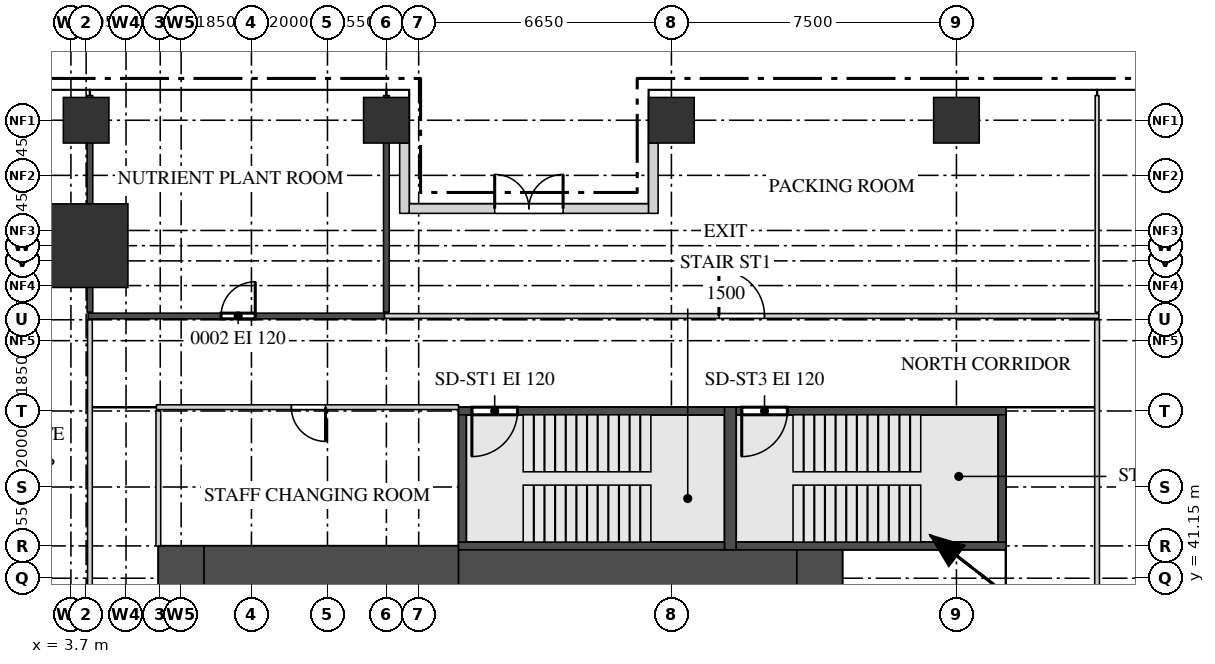
"""IFC4 building model, lengths in metres.
Left out: names, types, materials, properties, quantities, classifications, styles, units other than length and angle.
Written with IfcOpenShell. Run it as: python <this file> out.ifc"""

import sys

from ifc_helpers import new_model, si_unit, direction, frame, frame_2d, origin, origin_2d, place, context, subcontext, project, spatial, rectangle, extrude, source, transform, mapped, element, fill, save


model = new_model("IFC4")
c1 = context("Model", 3, precision=1e-05, world=origin(), true_north=direction((0.0, 1.0)))
c2 = subcontext(c1, "Body", "Model", "MODEL_VIEW")
j1 = project(units=[si_unit("LENGTHUNIT", "METRE"), si_unit("PLANEANGLEUNIT", "RADIAN")], contexts=[c1])
p1 = place(None, origin())
s1 = spatial("IfcSite", under=j1, at=p1, CompositionType="ELEMENT")
p2 = place(p1, origin())
s2 = spatial("IfcBuilding", under=s1, at=p2, CompositionType="ELEMENT")
p3 = place(p2, frame((0.0, 0.0, 73.5)))
s3 = spatial("IfcBuildingStorey", under=s2, at=p3, CompositionType="ELEMENT", Elevation=73.5)
m1 = source(origin(), c2, "Body", "SweptSolid", [
    extrude(rectangle(XDim=6.7, YDim=1.2, at=frame_2d((3.35, 0.0))), origin(), (0.0, 0.0, 1.0), 4.2),
])
p4 = place(p3, frame((7.2, 41.4, 0.0), z_axis=(0.0, 0.0, 1.0), x_axis=(1.0, 0.0, 0.0)))
e1 = element("IfcWall", 1, at=p4, inside=s3, PredefinedType="SHEAR", context=c2, shape_type="MappedRepresentation", body=[
    mapped(m1, transform((0.0, 0.0, 0.0))),
])
m2 = source(origin(), c2, "Body", "SweptSolid", [
    extrude(rectangle(XDim=8.9, YDim=1.1, at=frame_2d((4.45, 0.0))), origin(), (0.0, 0.0, 1.0), 4.2),
])
p5 = place(p3, frame((13.9, 41.35, 0.0), z_axis=(0.0, 0.0, 1.0), x_axis=(1.0, 0.0, 0.0)))
e2 = element("IfcWall", 2, at=p5, inside=s3, PredefinedType="SHEAR", context=c2, shape_type="MappedRepresentation", body=[
    mapped(m2, transform((0.0, 0.0, 0.0))),
])
m3 = source(origin(), c2, "Body", "SweptSolid", [
    extrude(rectangle(XDim=1.2, YDim=1.1, at=frame_2d((0.6, 0.0))), origin(), (0.0, 0.0, 1.0), 4.2),
])
p6 = place(p3, frame((22.8, 41.35, 0.0), z_axis=(0.0, 0.0, 1.0), x_axis=(1.0, 0.0, 0.0)))
e3 = element("IfcWall", 3, at=p6, inside=s3, PredefinedType="SHEAR", context=c2, shape_type="MappedRepresentation", body=[
    mapped(m3, transform((0.0, 0.0, 0.0))),
])
m4 = source(origin(), c2, "Body", "SweptSolid", [
    extrude(rectangle(XDim=1.2, YDim=1.2, at=frame_2d((0.6, 0.0))), origin(), (0.0, 0.0, 1.0), 4.2),
])
p7 = place(p3, frame((6.0, 41.4, 0.0), z_axis=(0.0, 0.0, 1.0), x_axis=(1.0, 0.0, 0.0)))
e4 = element("IfcWall", 4, at=p7, inside=s3, PredefinedType="SHEAR", context=c2, shape_type="MappedRepresentation", body=[
    mapped(m4, transform((0.0, 0.0, 0.0))),
])
m5 = source(origin(), c2, "Body", "SweptSolid", [
    extrude(rectangle(XDim=7.0, YDim=0.2, at=frame_2d((3.5, 0.0))), origin(), (0.0, 0.0, 1.0), 4.2),
])
p8 = place(p3, frame((13.9, 45.55, 0.0), z_axis=(0.0, 0.0, 1.0), x_axis=(1.0, 0.0, 0.0)))
e5 = element("IfcWall", 5, at=p8, inside=s3, PredefinedType="SHEAR", context=c2, shape_type="MappedRepresentation", body=[
    mapped(m5, transform((0.0, 0.0, 0.0))),
])
m6 = source(origin(), c2, "Body", "SweptSolid", [
    extrude(rectangle(XDim=1.2, YDim=2.1, at=frame_2d((0.6, 1.05))), frame((0.0, 0.11, 0.0), z_axis=(0.0, -1.0, 0.0), x_axis=(1.0, 0.0, 0.0)), (0.0, 0.0, 1.0), 0.22),
])
p9 = place(p8, frame((0.35, 0.0, 0.0)))
e6 = element("IfcOpeningElement", 6, at=p9, cuts=e5, PredefinedType="OPENING", context=c2, shape_type="MappedRepresentation", body=[
    mapped(m6, transform((0.0, 0.0, 0.0))),
])
p10 = place(p3, frame((13.9, 42.0, 0.0), z_axis=(0.0, 0.0, 1.0), x_axis=(1.0, 0.0, 0.0)))
e7 = element("IfcWall", 7, at=p10, inside=s3, PredefinedType="SHEAR", context=c2, shape_type="MappedRepresentation", body=[
    mapped(m5, transform((0.0, 0.0, 0.0))),
])
m7 = source(origin(), c2, "Body", "SweptSolid", [
    extrude(rectangle(XDim=7.1, YDim=0.2, at=frame_2d((3.55, 0.0))), origin(), (0.0, 0.0, 1.0), 4.2),
])
p11 = place(p3, frame((21.2, 45.55, 0.0), z_axis=(0.0, 0.0, 1.0), x_axis=(1.0, 0.0, 0.0)))
e8 = element("IfcWall", 8, at=p11, inside=s3, PredefinedType="SHEAR", context=c2, shape_type="MappedRepresentation", body=[
    mapped(m7, transform((0.0, 0.0, 0.0))),
])
p12 = place(p11, frame((0.15, 0.0, 0.0)))
e9 = element("IfcOpeningElement", 9, at=p12, cuts=e8, PredefinedType="OPENING", context=c2, shape_type="MappedRepresentation", body=[
    mapped(m6, transform((0.0, 0.0, 0.0))),
])
p13 = place(p3, frame((21.2, 42.0, 0.0), z_axis=(0.0, 0.0, 1.0), x_axis=(1.0, 0.0, 0.0)))
e10 = element("IfcWall", 10, at=p13, inside=s3, PredefinedType="SHEAR", context=c2, shape_type="MappedRepresentation", body=[
    mapped(m7, transform((0.0, 0.0, 0.0))),
])
m8 = source(origin(), c2, "Body", "SweptSolid", [
    extrude(rectangle(XDim=3.75, YDim=0.3, at=frame_2d((1.875, 0.0))), origin(), (0.0, 0.0, 1.0), 4.2),
])
p14 = place(p3, frame((21.05, 41.9, 0.0), z_axis=(0.0, 0.0, 1.0), x_axis=(0.0, 1.0, 0.0)))
e11 = element("IfcWall", 11, at=p14, inside=s3, PredefinedType="SHEAR", context=c2, shape_type="MappedRepresentation", body=[
    mapped(m8, transform((0.0, 0.0, 0.0))),
])
m9 = source(origin(), c2, "Body", "SweptSolid", [
    extrude(rectangle(XDim=3.35, YDim=0.2, at=frame_2d((1.675, 0.0))), origin(), (0.0, 0.0, 1.0), 4.2),
])
for number, where, z_axis, x_axis in (
    (12, (14.0, 42.1, 0.0), (0.0, 0.0, 1.0), (0.0, 1.0, 0.0)),
    (13, (28.2, 42.1, 0.0), (0.0, 0.0, 1.0), (0.0, 1.0, 0.0)),
):
    element("IfcWall", number, at=place(p3, frame(where, z_axis=z_axis, x_axis=x_axis)), inside=s3, PredefinedType="SHEAR", context=c2, shape_type="MappedRepresentation", body=[
        mapped(m9, transform((0.0, 0.0, 0.0))),
    ])
m10 = source(origin(), c2, "Body", "SweptSolid", [
    extrude(rectangle(XDim=2.2, YDim=2.2, at=origin_2d()), origin(), (0.0, 0.0, 1.0), 4.5),
])
p15 = place(p3, frame((4.1, 49.9, 0.0), z_axis=(0.0, 0.0, 1.0), x_axis=(1.0, 0.0, 0.0)))
e14 = element("IfcColumn", 14, at=p15, inside=s3, PredefinedType="COLUMN", context=c2, shape_type="MappedRepresentation", body=[
    mapped(m10, transform((0.0, 0.0, 0.0))),
])
m11 = source(origin(), c2, "Body", "SweptSolid", [
    extrude(rectangle(XDim=1.2, YDim=1.2, at=origin_2d()), origin(), (0.0, 0.0, 1.0), 4.2),
])
for number, where, z_axis, x_axis in (
    (15, (4.1, 53.2, 0.0), (0.0, 0.0, 1.0), (1.0, 0.0, 0.0)),
    (16, (12.0, 53.2, 0.0), (0.0, 0.0, 1.0), (1.0, 0.0, 0.0)),
    (17, (19.5, 53.2, 0.0), (0.0, 0.0, 1.0), (1.0, 0.0, 0.0)),
    (18, (27.0, 53.2, 0.0), (0.0, 0.0, 1.0), (1.0, 0.0, 0.0)),
):
    element("IfcColumn", number, at=place(p3, frame(where, z_axis=z_axis, x_axis=x_axis)), inside=s3, PredefinedType="COLUMN", context=c2, shape_type="MappedRepresentation", body=[
        mapped(m11, transform((0.0, 0.0, 0.0))),
    ])
m12 = source(origin(), c2, "Body", "SweptSolid", [
    extrude(rectangle(XDim=6.3, YDim=0.25, at=frame_2d((3.15, 0.0))), origin(), (0.0, 0.0, 1.0), 4.2),
])
p16 = place(p3, frame((12.6, 50.875, 0.0), z_axis=(0.0, 0.0, 1.0), x_axis=(1.0, 0.0, 0.0)))
e19 = element("IfcWall", 19, at=p16, inside=s3, PredefinedType="SOLIDWALL", context=c2, shape_type="MappedRepresentation", body=[
    mapped(m12, transform((0.0, 0.0, 0.0))),
])
m13 = source(origin(), c2, "Body", "SweptSolid", [
    extrude(rectangle(XDim=1.6, YDim=2.4, at=frame_2d((0.8, 1.2))), frame((0.0, 0.135, 0.0), z_axis=(0.0, -1.0, 0.0), x_axis=(1.0, 0.0, 0.0)), (0.0, 0.0, 1.0), 0.27),
])
p17 = place(p16, frame((0.35, 0.0, 0.0)))
e20 = element("IfcOpeningElement", 20, at=p17, cuts=e19, PredefinedType="OPENING", context=c2, shape_type="MappedRepresentation", body=[
    mapped(m13, transform((0.0, 0.0, 0.0))),
])
p18 = place(p16, frame((4.35, 0.0, 0.0)))
e21 = element("IfcOpeningElement", 21, at=p18, cuts=e19, PredefinedType="OPENING", context=c2, shape_type="MappedRepresentation", body=[
    mapped(m13, transform((0.0, 0.0, 0.0))),
])
m14 = source(origin(), c2, "Body", "SweptSolid", [
    extrude(rectangle(XDim=1.8, YDim=2.4, at=frame_2d((0.9, 1.2))), frame((0.0, 0.135, 0.0), z_axis=(0.0, -1.0, 0.0), x_axis=(1.0, 0.0, 0.0)), (0.0, 0.0, 1.0), 0.27),
])
p19 = place(p16, frame((2.25, 0.0, 0.0)))
e22 = element("IfcOpeningElement", 22, at=p19, cuts=e19, PredefinedType="OPENING", context=c2, shape_type="MappedRepresentation", body=[
    mapped(m14, transform((0.0, 0.0, 0.0))),
])
m15 = source(origin(), c2, "Body", "SweptSolid", [
    extrude(rectangle(XDim=1.85, YDim=0.25, at=frame_2d((0.925, 0.0))), origin(), (0.0, 0.0, 1.0), 3.9),
])
for number, where, z_axis, x_axis in (
    (23, (12.475, 52.6, 0.0), (0.0, 0.0, 1.0), (0.0, -1.0, 0.0)),
    (24, (19.025, 52.6, 0.0), (0.0, 0.0, 1.0), (0.0, -1.0, 0.0)),
):
    element("IfcWall", number, at=place(p3, frame(where, z_axis=z_axis, x_axis=x_axis)), inside=s3, PredefinedType="SOLIDWALL", context=c2, shape_type="MappedRepresentation", body=[
        mapped(m15, transform((0.0, 0.0, 0.0))),
    ])
m16 = source(origin(), c2, "Body", "SweptSolid", [
    extrude(rectangle(XDim=41.8, YDim=0.125, at=frame_2d((20.9, 0.0))), origin(), (0.0, 0.0, 1.0), 4.3),
])
p20 = place(p3, frame((4.2, 6.15, 0.0), z_axis=(0.0, 0.0, 1.0), x_axis=(0.0, 1.0, 0.0)))
e25 = element("IfcWall", 25, at=p20, inside=s3, PredefinedType="PARTITIONING", context=c2, shape_type="MappedRepresentation", body=[
    mapped(m16, transform((0.0, 0.0, 0.0))),
])
m17 = source(origin(), c2, "Body", "SweptSolid", [
    extrude(rectangle(XDim=1.2, YDim=2.1, at=frame_2d((0.6, 1.05))), frame((0.0, 0.073, 0.0), z_axis=(0.0, -1.0, 0.0), x_axis=(1.0, 0.0, 0.0)), (0.0, 0.0, 1.0), 0.145),
])
p21 = place(p20, frame((3.45, 0.0, 0.0)))
e26 = element("IfcOpeningElement", 26, at=p21, cuts=e25, PredefinedType="OPENING", context=c2, shape_type="MappedRepresentation", body=[
    mapped(m17, transform((0.0, 0.0, 0.0))),
])
m18 = source(origin(), c2, "Body", "SweptSolid", [
    extrude(rectangle(XDim=0.9, YDim=2.1, at=frame_2d((0.45, 1.05))), frame((0.0, 0.073, 0.0), z_axis=(0.0, -1.0, 0.0), x_axis=(1.0, 0.0, 0.0)), (0.0, 0.0, 1.0), 0.145),
])
p22 = place(p20, frame((13.25, 0.0, 0.0)))
e27 = element("IfcOpeningElement", 27, at=p22, cuts=e25, PredefinedType="OPENING", context=c2, shape_type="MappedRepresentation", body=[
    mapped(m18, transform((0.0, 0.0, 0.0))),
])
p23 = place(p20, frame((30.35, 0.0, 0.0)))
e28 = element("IfcOpeningElement", 28, at=p23, cuts=e25, PredefinedType="OPENING", context=c2, shape_type="MappedRepresentation", body=[
    mapped(m18, transform((0.0, 0.0, 0.0))),
])
m19 = source(origin(), c2, "Body", "SweptSolid", [
    extrude(rectangle(XDim=10.15, YDim=0.125, at=frame_2d((5.075, 0.0))), origin(), (0.0, 0.0, 1.0), 4.3),
])
p24 = place(p3, frame((30.7, 37.8, 0.0), z_axis=(0.0, 0.0, 1.0), x_axis=(0.0, 1.0, 0.0)))
e29 = element("IfcWall", 29, at=p24, inside=s3, PredefinedType="PARTITIONING", context=c2, shape_type="MappedRepresentation", body=[
    mapped(m19, transform((0.0, 0.0, 0.0))),
])
m20 = source(origin(), c2, "Body", "SweptSolid", [
    extrude(rectangle(XDim=3.55, YDim=0.125, at=frame_2d((1.775, 0.0))), origin(), (0.0, 0.0, 1.0), 4.3),
])
p25 = place(p3, frame((6.0, 42.0, 0.0), z_axis=(0.0, 0.0, 1.0), x_axis=(0.0, 1.0, 0.0)))
e30 = element("IfcWall", 30, at=p25, inside=s3, PredefinedType="PARTITIONING", context=c2, shape_type="MappedRepresentation", body=[
    mapped(m20, transform((0.0, 0.0, 0.0))),
])
m21 = source(origin(), c2, "Body", "SweptSolid", [
    extrude(rectangle(XDim=7.95, YDim=0.125, at=frame_2d((3.975, 0.0))), origin(), (0.0, 0.0, 1.0), 4.3),
])
p26 = place(p3, frame((5.95, 45.65, 0.0), z_axis=(0.0, 0.0, 1.0), x_axis=(1.0, 0.0, 0.0)))
e31 = element("IfcWall", 31, at=p26, inside=s3, PredefinedType="PARTITIONING", context=c2, shape_type="MappedRepresentation", body=[
    mapped(m21, transform((0.0, 0.0, 0.0))),
])
p27 = place(p26, frame((3.55, 0.0, 0.0)))
e32 = element("IfcOpeningElement", 32, at=p27, cuts=e31, PredefinedType="OPENING", context=c2, shape_type="MappedRepresentation", body=[
    mapped(m18, transform((0.0, 0.0, 0.0))),
])
m22 = source(origin(), c2, "Body", "SweptSolid", [
    extrude(rectangle(XDim=7.8, YDim=0.15, at=frame_2d((3.9, 0.0))), origin(), (0.0, 0.0, 1.0), 4.3),
])
p28 = place(p3, frame((4.15, 48.05, 0.0), z_axis=(0.0, 0.0, 1.0), x_axis=(1.0, 0.0, 0.0)))
e33 = element("IfcWall", 33, at=p28, inside=s3, PredefinedType="PARTITIONING", context=c2, shape_type="MappedRepresentation", body=[
    mapped(m22, transform((0.0, 0.0, 0.0))),
])
m23 = source(origin(), c2, "Body", "SweptSolid", [
    extrude(rectangle(XDim=0.9, YDim=2.1, at=frame_2d((0.45, 1.05))), frame((0.0, 0.085, 0.0), z_axis=(0.0, -1.0, 0.0), x_axis=(1.0, 0.0, 0.0)), (0.0, 0.0, 1.0), 0.17),
])
p29 = place(p28, frame((3.5, 0.0, 0.0)))
e34 = element("IfcOpeningElement", 34, at=p29, cuts=e33, PredefinedType="OPENING", context=c2, shape_type="MappedRepresentation", body=[
    mapped(m23, transform((0.0, 0.0, 0.0))),
])
m24 = source(origin(), c2, "Body", "SweptSolid", [
    extrude(rectangle(XDim=18.8, YDim=0.125, at=frame_2d((9.4, 0.0))), origin(), (0.0, 0.0, 1.0), 4.3),
])
p30 = place(p3, frame((11.95, 48.05, 0.0), z_axis=(0.0, 0.0, 1.0), x_axis=(1.0, 0.0, 0.0)))
e35 = element("IfcWall", 35, at=p30, inside=s3, PredefinedType="PARTITIONING", context=c2, shape_type="MappedRepresentation", body=[
    mapped(m24, transform((0.0, 0.0, 0.0))),
])
p31 = place(p30, frame((8.8, 0.0, 0.0)))
e36 = element("IfcOpeningElement", 36, at=p31, cuts=e35, PredefinedType="OPENING", context=c2, shape_type="MappedRepresentation", body=[
    mapped(m17, transform((0.0, 0.0, 0.0))),
])
m25 = source(origin(), c2, "Body", "SweptSolid", [
    extrude(rectangle(XDim=5.7, YDim=0.15, at=frame_2d((2.85, 0.0))), origin(), (0.0, 0.0, 1.0), 3.6),
])
p32 = place(p3, frame((4.2, 48.15, 0.0), z_axis=(0.0, 0.0, 1.0), x_axis=(0.0, 1.0, 0.0)))
e37 = element("IfcWall", 37, at=p32, inside=s3, PredefinedType="PARTITIONING", context=c2, shape_type="MappedRepresentation", body=[
    mapped(m25, transform((0.0, 0.0, 0.0))),
])
m26 = source(origin(), c2, "Body", "SweptSolid", [
    extrude(rectangle(XDim=5.7, YDim=0.15, at=frame_2d((2.85, 0.0))), origin(), (0.0, 0.0, 1.0), 3.7),
])
p33 = place(p3, frame((12.0, 48.15, 0.0), z_axis=(0.0, 0.0, 1.0), x_axis=(0.0, 1.0, 0.0)))
e38 = element("IfcWall", 38, at=p33, inside=s3, PredefinedType="PARTITIONING", context=c2, shape_type="MappedRepresentation", body=[
    mapped(m26, transform((0.0, 0.0, 0.0))),
])
m27 = source(origin(), c2, "Body", "SweptSolid", [
    extrude(rectangle(XDim=5.7, YDim=0.1, at=frame_2d((2.85, 0.0))), origin(), (0.0, 0.0, 1.0), 4.3),
])
p34 = place(p3, frame((30.7, 48.15, 0.0), z_axis=(0.0, 0.0, 1.0), x_axis=(0.0, 1.0, 0.0)))
e39 = element("IfcWall", 39, at=p34, inside=s3, PredefinedType="PARTITIONING", context=c2, shape_type="MappedRepresentation", body=[
    mapped(m27, transform((0.0, 0.0, 0.0))),
])
m28 = source(origin(), c2, "Body", "SweptSolid", [
    extrude(rectangle(XDim=1.6, YDim=2.4, at=frame_2d((0.8, 1.2))), frame((0.0, 0.03, 0.0), z_axis=(0.0, -1.0, 0.0), x_axis=(1.0, 0.0, 0.0)), (0.0, 0.0, 1.0), 0.06),
])
p35 = place(p17, origin())
e40 = element("IfcWindow", 40, at=p35, inside=s3, PartitioningType="SINGLE_PANEL", PredefinedType="WINDOW", context=c2, shape_type="MappedRepresentation", body=[
    mapped(m28, transform((0.0, 0.0, 0.0))),
])
fill(e20, e40)
p36 = place(p18, origin())
e41 = element("IfcWindow", 41, at=p36, inside=s3, PartitioningType="SINGLE_PANEL", PredefinedType="WINDOW", context=c2, shape_type="MappedRepresentation", body=[
    mapped(m28, transform((0.0, 0.0, 0.0))),
])
fill(e21, e41)
m29 = source(origin(), c2, "Body", "SweptSolid", [
    extrude(rectangle(XDim=1.8, YDim=2.4, at=frame_2d((0.9, 1.2))), frame((0.0, 0.025, 0.0), z_axis=(0.0, -1.0, 0.0), x_axis=(1.0, 0.0, 0.0)), (0.0, 0.0, 1.0), 0.05),
])
p37 = place(p19, origin())
e42 = element("IfcDoor", 42, at=p37, inside=s3, OperationType="DOUBLE_DOOR_DOUBLE_SWING", PredefinedType="DOOR", context=c2, shape_type="MappedRepresentation", body=[
    mapped(m29, transform((0.0, 0.0, 0.0))),
])
fill(e22, e42)
m30 = source(origin(), c2, "Body", "SweptSolid", [
    extrude(rectangle(XDim=0.9, YDim=2.1, at=frame_2d((0.45, 1.05))), frame((0.0, 0.025, 0.0), z_axis=(0.0, -1.0, 0.0), x_axis=(1.0, 0.0, 0.0)), (0.0, 0.0, 1.0), 0.05),
])
p38 = place(p29, origin())
e43 = element("IfcDoor", 43, at=p38, inside=s3, OperationType="SINGLE_SWING_LEFT", PredefinedType="DOOR", context=c2, shape_type="MappedRepresentation", body=[
    mapped(m30, transform((0.0, 0.0, 0.0))),
])
fill(e34, e43)
m31 = source(origin(), c2, "Body", "SweptSolid", [
    extrude(rectangle(XDim=1.2, YDim=2.1, at=frame_2d((0.6, 1.05))), frame((0.0, 0.025, 0.0), z_axis=(0.0, -1.0, 0.0), x_axis=(1.0, 0.0, 0.0)), (0.0, 0.0, 1.0), 0.05),
])
p39 = place(p31, origin())
e44 = element("IfcDoor", 44, at=p39, inside=s3, OperationType="SINGLE_SWING_RIGHT", PredefinedType="DOOR", context=c2, shape_type="MappedRepresentation", body=[
    mapped(m31, transform((0.0, 0.0, 0.0))),
])
fill(e36, e44)
p40 = place(p27, origin())
e45 = element("IfcDoor", 45, at=p40, inside=s3, OperationType="SINGLE_SWING_RIGHT", PredefinedType="DOOR", context=c2, shape_type="MappedRepresentation", body=[
    mapped(m30, transform((0.0, 0.0, 0.0))),
])
fill(e32, e45)
p41 = place(p9, origin())
e46 = element("IfcDoor", 46, at=p41, inside=s3, OperationType="SINGLE_SWING_LEFT", PredefinedType="DOOR", context=c2, shape_type="MappedRepresentation", body=[
    mapped(m31, transform((0.0, 0.0, 0.0))),
])
fill(e6, e46)
p42 = place(p12, origin())
e47 = element("IfcDoor", 47, at=p42, inside=s3, OperationType="SINGLE_SWING_LEFT", PredefinedType="DOOR", context=c2, shape_type="MappedRepresentation", body=[
    mapped(m31, transform((0.0, 0.0, 0.0))),
])
fill(e9, e47)
save(model, sys.argv[1])
